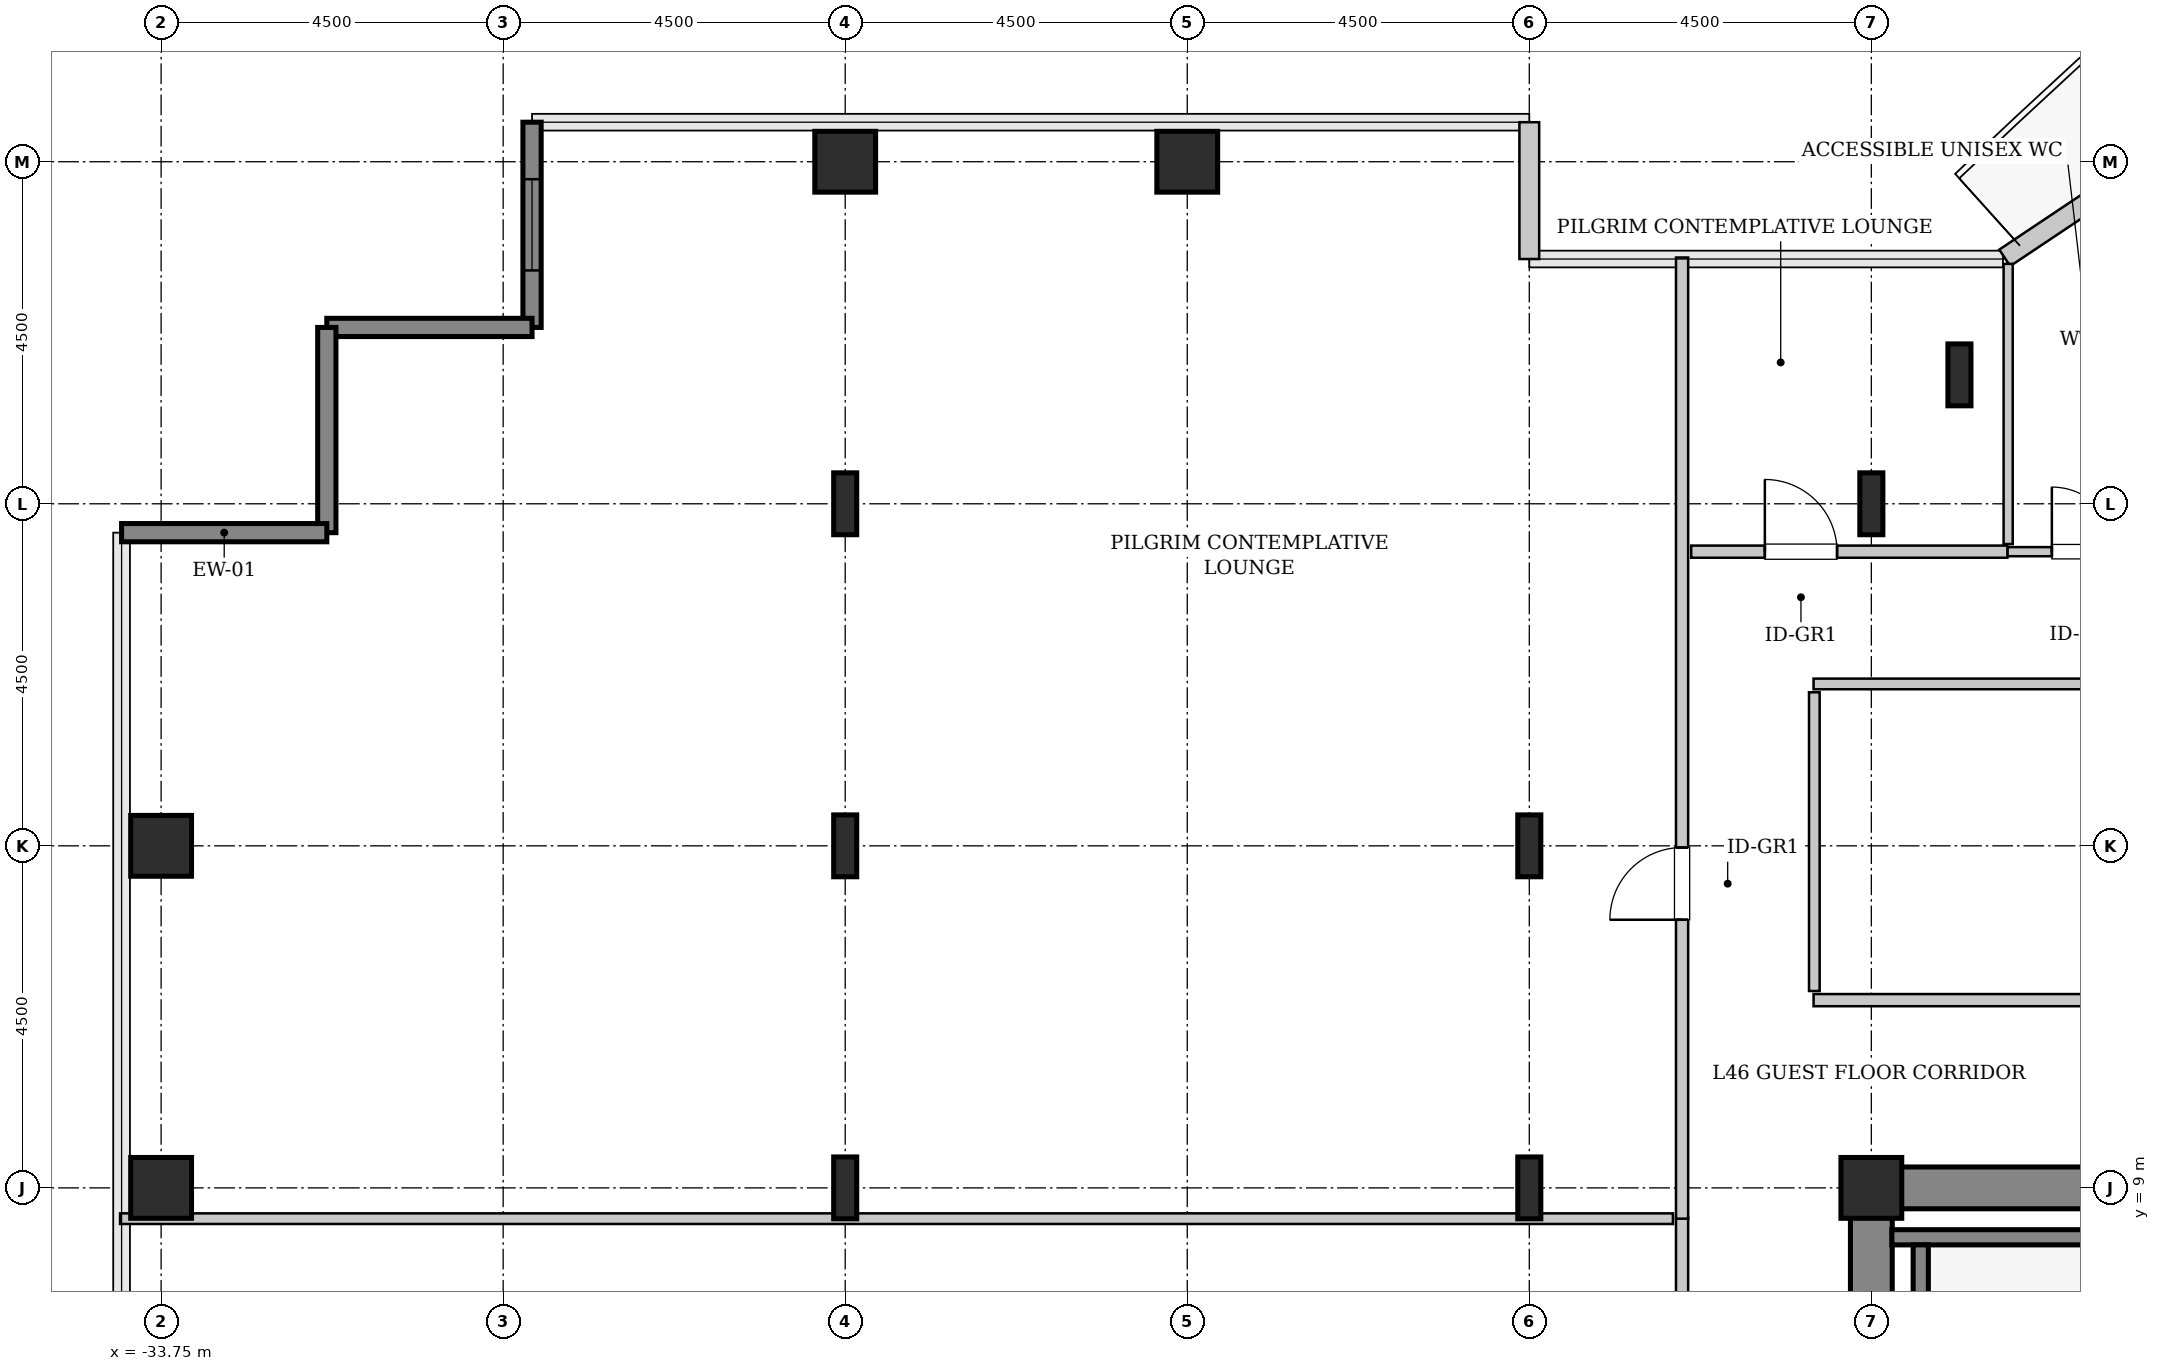
"""IFC4 building model, lengths in metres.
Left out: names, types, materials, properties, quantities, classifications, styles, units other than length and angle.
Written with IfcOpenShell. Run it as: python <this file> out.ifc"""

import sys

from ifc_helpers import new_model, si_unit, direction, frame, frame_2d, origin, origin_2d, place, context, subcontext, project, spatial, rectangle, hollow_rectangle, i_section, extrude, source, transform, mapped, element, fill, save


model = new_model("IFC4")
c1 = context("Model", 3, precision=1e-05, world=origin(), true_north=direction((0.0, 1.0)))
c2 = subcontext(c1, "Body", "Model", "MODEL_VIEW")
j1 = project(units=[si_unit("LENGTHUNIT", "METRE"), si_unit("PLANEANGLEUNIT", "RADIAN")], contexts=[c1])
p1 = place(None, origin())
s1 = spatial("IfcSite", under=j1, at=p1, CompositionType="ELEMENT")
p2 = place(p1, origin())
s2 = spatial("IfcBuilding", under=s1, at=p2, CompositionType="ELEMENT")
p3 = place(p2, frame((0.0, 0.0, 186.8)))
s3 = spatial("IfcBuildingStorey", under=s2, at=p3, CompositionType="ELEMENT", Elevation=186.8)
m1 = source(origin(), c2, "Body", "SweptSolid", [
    extrude(rectangle(XDim=9.975, YDim=0.55, at=frame_2d((4.987, 0.0))), origin(), (0.0, 0.0, 1.0), 3.8),
])
p4 = place(p3, frame((-11.525, 9.0, 0.0), z_axis=(0.0, 0.0, 1.0), x_axis=(1.0, 0.0, 0.0)))
e1 = element("IfcWall", 1, at=p4, inside=s3, PredefinedType="SHEAR", context=c2, shape_type="MappedRepresentation", body=[
    mapped(m1, transform((0.0, 0.0, 0.0), x_axis=(1.0, 0.0, 0.0), y_axis=(0.0, 1.0, 0.0), z_axis=(0.0, 0.0, 1.0), scale=1.0)),
])
m2 = source(origin(), c2, "Body", "SweptSolid", [
    extrude(rectangle(XDim=7.375, YDim=0.55, at=frame_2d((3.688, 0.0))), origin(), (0.0, 0.0, 1.0), 3.8),
])
p5 = place(p3, frame((-11.25, 1.35, 0.0), z_axis=(0.0, 0.0, 1.0), x_axis=(0.0, 1.0, 0.0)))
e2 = element("IfcWall", 2, at=p5, inside=s3, PredefinedType="SHEAR", context=c2, shape_type="MappedRepresentation", body=[
    mapped(m2, transform((0.0, 0.0, 0.0), x_axis=(1.0, 0.0, 0.0), y_axis=(0.0, 1.0, 0.0), z_axis=(0.0, 0.0, 1.0), scale=1.0)),
])
m3 = source(origin(), c2, "Body", "SweptSolid", [
    extrude(hollow_rectangle(XDim=0.8, YDim=0.8, WallThickness=0.04, InnerFilletRadius=0.04, OuterFilletRadius=0.08, at=origin_2d()), origin(), (0.0, 0.0, 1.0), 3.8),
])
for number, where, z_axis, x_axis in (
    (3, (-33.75, 9.0, 0.0), (0.0, 0.0, 1.0), (1.0, 0.0, 0.0)),
    (4, (-33.75, 13.5, 0.0), (0.0, 0.0, 1.0), (1.0, 0.0, 0.0)),
):
    element("IfcColumn", number, at=place(p3, frame(where, z_axis=z_axis, x_axis=x_axis)), inside=s3, PredefinedType="COLUMN", context=c2, shape_type="MappedRepresentation", body=[
        mapped(m3, transform((0.0, 0.0, 0.0), x_axis=(1.0, 0.0, 0.0), y_axis=(0.0, 1.0, 0.0), z_axis=(0.0, 0.0, 1.0), scale=1.0)),
    ])
m4 = source(origin(), c2, "Body", "SweptSolid", [
    extrude(i_section(OverallWidth=0.303, OverallDepth=0.814, WebThickness=0.021, FlangeThickness=0.04, FilletRadius=0.03, at=origin_2d()), origin(), (0.0, 0.0, 1.0), 3.8),
])
for number, where, z_axis, x_axis in (
    (5, (-24.75, 9.0, 0.0), (0.0, 0.0, 1.0), (1.0, 0.0, 0.0)),
    (6, (-24.75, 13.5, 0.0), (0.0, 0.0, 1.0), (1.0, 0.0, 0.0)),
    (7, (-24.75, 18.0, 0.0), (0.0, 0.0, 1.0), (1.0, 0.0, 0.0)),
):
    element("IfcColumn", number, at=place(p3, frame(where, z_axis=z_axis, x_axis=x_axis)), inside=s3, PredefinedType="COLUMN", context=c2, shape_type="MappedRepresentation", body=[
        mapped(m4, transform((0.0, 0.0, 0.0), x_axis=(1.0, 0.0, 0.0), y_axis=(0.0, 1.0, 0.0), z_axis=(0.0, 0.0, 1.0), scale=1.0)),
    ])
for number, where, z_axis, x_axis in (
    (8, (-24.75, 22.5, 0.0), (0.0, 0.0, 1.0), (1.0, 0.0, 0.0)),
    (9, (-20.25, 22.5, 0.0), (0.0, 0.0, 1.0), (1.0, 0.0, 0.0)),
):
    element("IfcColumn", number, at=place(p3, frame(where, z_axis=z_axis, x_axis=x_axis)), inside=s3, PredefinedType="COLUMN", context=c2, shape_type="MappedRepresentation", body=[
        mapped(m3, transform((0.0, 0.0, 0.0), x_axis=(1.0, 0.0, 0.0), y_axis=(0.0, 1.0, 0.0), z_axis=(0.0, 0.0, 1.0), scale=1.0)),
    ])
for number, where, z_axis, x_axis in (
    (10, (-15.75, 9.0, 0.0), (0.0, 0.0, 1.0), (1.0, 0.0, 0.0)),
    (11, (-15.75, 13.5, 0.0), (0.0, 0.0, 1.0), (1.0, 0.0, 0.0)),
):
    element("IfcColumn", number, at=place(p3, frame(where, z_axis=z_axis, x_axis=x_axis)), inside=s3, PredefinedType="COLUMN", context=c2, shape_type="MappedRepresentation", body=[
        mapped(m4, transform((0.0, 0.0, 0.0), x_axis=(1.0, 0.0, 0.0), y_axis=(0.0, 1.0, 0.0), z_axis=(0.0, 0.0, 1.0), scale=1.0)),
    ])
m5 = source(origin(), c2, "Body", "SweptSolid", [
    extrude(hollow_rectangle(XDim=0.8, YDim=0.8, WallThickness=0.04, InnerFilletRadius=0.04, OuterFilletRadius=0.08, at=origin_2d()), origin(), (0.0, 0.0, 1.0), 3.8),
])
p6 = place(p3, frame((-11.25, 9.0, 0.0), z_axis=(0.0, 0.0, 1.0), x_axis=(1.0, 0.0, 0.0)))
e12 = element("IfcColumn", 12, at=p6, inside=s3, PredefinedType="COLUMN", context=c2, shape_type="MappedRepresentation", body=[
    mapped(m5, transform((0.0, 0.0, 0.0), x_axis=(1.0, 0.0, 0.0), y_axis=(0.0, 1.0, 0.0), z_axis=(0.0, 0.0, 1.0), scale=1.0)),
])
for number, where, z_axis, x_axis in (
    (13, (-11.25, 18.0, 0.0), (0.0, 0.0, 1.0), (1.0, 0.0, 0.0)),
    (14, (-10.091, 19.696, 0.0), (0.0, 0.0, 1.0), (1.0, 0.0, 0.0)),
):
    element("IfcColumn", number, at=place(p3, frame(where, z_axis=z_axis, x_axis=x_axis)), inside=s3, PredefinedType="COLUMN", context=c2, shape_type="MappedRepresentation", body=[
        mapped(m4, transform((0.0, 0.0, 0.0), x_axis=(1.0, 0.0, 0.0), y_axis=(0.0, 1.0, 0.0), z_axis=(0.0, 0.0, 1.0), scale=1.0)),
    ])
m6 = source(origin(), c2, "Body", "SweptSolid", [
    extrude(rectangle(XDim=1.469, YDim=0.26, at=frame_2d((0.734, 0.0))), origin(), (0.0, 0.0, 1.0), 3.55),
])
p7 = place(p3, frame((-8.273, 22.052, 0.0), z_axis=(0.0, 0.0, 1.0), x_axis=(-0.831461760506, -0.555581983884, 0.0)))
e15 = element("IfcWall", 15, at=p7, inside=s3, PredefinedType="SOLIDWALL", context=c2, shape_type="MappedRepresentation", body=[
    mapped(m6, transform((0.0, 0.0, 0.0), x_axis=(1.0, 0.0, 0.0), y_axis=(0.0, 1.0, 0.0), z_axis=(0.0, 0.0, 1.0), scale=1.0)),
])
m7 = source(origin(), c2, "Body", "SweptSolid", [
    extrude(rectangle(XDim=1.8, YDim=0.26, at=frame_2d((0.9, 0.0))), origin(), (0.0, 0.0, 1.0), 3.55),
])
p8 = place(p3, frame((-15.75, 21.22, 0.0), z_axis=(0.0, 0.0, 1.0), x_axis=(0.0, 1.0, 0.0)))
e16 = element("IfcWall", 16, at=p8, inside=s3, PredefinedType="SOLIDWALL", context=c2, shape_type="MappedRepresentation", body=[
    mapped(m7, transform((0.0, 0.0, 0.0), x_axis=(1.0, 0.0, 0.0), y_axis=(0.0, 1.0, 0.0), z_axis=(0.0, 0.0, 1.0), scale=1.0)),
])
m8 = source(origin(), c2, "Body", "SweptSolid", [
    extrude(rectangle(XDim=2.7, YDim=0.24, at=frame_2d((1.35, 0.0))), origin(), (0.0, 0.0, 1.0), 3.55),
])
p9 = place(p3, frame((-28.87, 23.02, 0.0), z_axis=(0.0, 0.0, 1.0), x_axis=(0.0, -1.0, 0.0)))
e17 = element("IfcWall", 17, at=p9, inside=s3, PredefinedType="SHEAR", context=c2, shape_type="MappedRepresentation", body=[
    mapped(m8, transform((0.0, 0.0, 0.0), x_axis=(1.0, 0.0, 0.0), y_axis=(0.0, 1.0, 0.0), z_axis=(0.0, 0.0, 1.0), scale=1.0)),
])
p10 = place(p9, frame((0.75, 0.0, 0.85)))
e18 = element("IfcOpeningElement", 18, at=p10, cuts=e17, PredefinedType="OPENING", context=c2, shape_type="SweptSolid", body=[
    extrude(rectangle(XDim=1.2, YDim=1.8, at=frame_2d((0.6, 0.9))), frame((0.0, 0.13, 0.0), z_axis=(0.0, -1.0, 0.0), x_axis=(1.0, 0.0, 0.0)), (0.0, 0.0, 1.0), 0.26),
])
for number, where, z_axis, x_axis in (
    (19, (-28.87, 20.32, 0.0), (0.0, 0.0, 1.0), (-1.0, 0.0, 0.0)),
    (20, (-31.57, 20.32, 0.0), (0.0, 0.0, 1.0), (0.0, -1.0, 0.0)),
    (21, (-31.57, 17.62, 0.0), (0.0, 0.0, 1.0), (-1.0, 0.0, 0.0)),
):
    element("IfcWall", number, at=place(p3, frame(where, z_axis=z_axis, x_axis=x_axis)), inside=s3, PredefinedType="SHEAR", context=c2, shape_type="MappedRepresentation", body=[
        mapped(m8, transform((0.0, 0.0, 0.0), x_axis=(1.0, 0.0, 0.0), y_axis=(0.0, 1.0, 0.0), z_axis=(0.0, 0.0, 1.0), scale=1.0)),
    ])
m9 = source(origin(), c2, "Body", "SweptSolid", [
    extrude(rectangle(XDim=3.68, YDim=0.2, at=frame_2d((1.84, 0.0))), origin(), (0.0, 0.0, 1.0), 3.8),
])
p11 = place(p3, frame((-7.3, 8.35, 0.0), z_axis=(0.0, 0.0, 1.0), x_axis=(-1.0, 0.0, 0.0)))
e22 = element("IfcWall", 22, at=p11, inside=s3, PredefinedType="SOLIDWALL", context=c2, shape_type="MappedRepresentation", body=[
    mapped(m9, transform((0.0, 0.0, 0.0), x_axis=(1.0, 0.0, 0.0), y_axis=(0.0, 1.0, 0.0), z_axis=(0.0, 0.0, 1.0), scale=1.0)),
])
m10 = source(origin(), c2, "Body", "SweptSolid", [
    extrude(rectangle(XDim=7.1, YDim=0.2, at=frame_2d((3.55, 0.0))), origin(), (0.0, 0.0, 1.0), 3.8),
])
p12 = place(p3, frame((-10.6, 1.15, 0.0), z_axis=(0.0, 0.0, 1.0), x_axis=(0.0, 1.0, 0.0)))
e23 = element("IfcWall", 23, at=p12, inside=s3, PredefinedType="SOLIDWALL", context=c2, shape_type="MappedRepresentation", body=[
    mapped(m10, transform((0.0, 0.0, 0.0), x_axis=(1.0, 0.0, 0.0), y_axis=(0.0, 1.0, 0.0), z_axis=(0.0, 0.0, 1.0), scale=1.0)),
])
m11 = source(origin(), c2, "Body", "SweptSolid", [
    extrude(rectangle(XDim=2.02, YDim=0.12, at=frame_2d((1.01, 0.0))), origin(), (0.0, 0.0, 1.0), 3.535),
])
p13 = place(p3, frame((-9.46, 17.37, 0.0), z_axis=(0.0, 0.0, 1.0), x_axis=(1.0, 0.0, 0.0)))
e24 = element("IfcWall", 24, at=p13, inside=s3, PredefinedType="PLUMBINGWALL", context=c2, shape_type="MappedRepresentation", body=[
    mapped(m11, transform((0.0, 0.0, 0.0), x_axis=(1.0, 0.0, 0.0), y_axis=(0.0, 1.0, 0.0), z_axis=(0.0, 0.0, 1.0), scale=1.0)),
])
p14 = place(p13, frame((0.585, 0.0, 0.0)))
e25 = element("IfcOpeningElement", 25, at=p14, cuts=e24, PredefinedType="OPENING", context=c2, shape_type="SweptSolid", body=[
    extrude(rectangle(XDim=0.85, YDim=2.1, at=frame_2d((0.425, 1.05))), frame((0.0, 0.07, 0.0), z_axis=(0.0, -1.0, 0.0), x_axis=(1.0, 0.0, 0.0)), (0.0, 0.0, 1.0), 0.14),
])
m12 = source(origin(), c2, "Body", "SweptSolid", [
    extrude(rectangle(XDim=3.687, YDim=0.12, at=frame_2d((1.843, 0.0))), origin(), (0.0, 0.0, 1.0), 3.535),
])
p15 = place(p3, frame((-9.45, 17.47, 0.0), z_axis=(0.0, 0.0, 1.0), x_axis=(0.0, 1.0, 0.0)))
e26 = element("IfcWall", 26, at=p15, inside=s3, PredefinedType="PLUMBINGWALL", context=c2, shape_type="MappedRepresentation", body=[
    mapped(m12, transform((0.0, 0.0, 0.0), x_axis=(1.0, 0.0, 0.0), y_axis=(0.0, 1.0, 0.0), z_axis=(0.0, 0.0, 1.0), scale=1.0)),
])
m13 = source(origin(), c2, "Body", "SweptSolid", [
    extrude(rectangle(XDim=3.21, YDim=0.16, at=frame_2d((1.605, 0.0))), origin(), (0.0, 0.0, 1.0), 3.535),
])
p16 = place(p3, frame((-13.74, 5.395, 0.0), z_axis=(0.0, 0.0, 1.0), x_axis=(0.0, 1.0, 0.0)))
e27 = element("IfcWall", 27, at=p16, inside=s3, PredefinedType="PARTITIONING", context=c2, shape_type="MappedRepresentation", body=[
    mapped(m13, transform((0.0, 0.0, 0.0), x_axis=(1.0, 0.0, 0.0), y_axis=(0.0, 1.0, 0.0), z_axis=(0.0, 0.0, 1.0), scale=1.0)),
])
p17 = place(p16, frame((1.13, 0.0, 0.0)))
e28 = element("IfcOpeningElement", 28, at=p17, cuts=e27, PredefinedType="OPENING", context=c2, shape_type="SweptSolid", body=[
    extrude(rectangle(XDim=0.95, YDim=2.1, at=frame_2d((0.475, 1.05))), frame((0.0, 0.09, 0.0), z_axis=(0.0, -1.0, 0.0), x_axis=(1.0, 0.0, 0.0)), (0.0, 0.0, 1.0), 0.18),
])
m14 = source(origin(), c2, "Body", "SweptSolid", [
    extrude(rectangle(XDim=20.43, YDim=0.14, at=frame_2d((10.215, 0.0))), origin(), (0.0, 0.0, 1.0), 2.875),
])
p18 = place(p3, frame((-34.29, 8.595, 0.0), z_axis=(0.0, 0.0, 1.0), x_axis=(1.0, 0.0, 0.0)))
e29 = element("IfcWall", 29, at=p18, inside=s3, PredefinedType="PARTITIONING", context=c2, shape_type="MappedRepresentation", body=[
    mapped(m14, transform((0.0, 0.0, 0.0), x_axis=(1.0, 0.0, 0.0), y_axis=(0.0, 1.0, 0.0), z_axis=(0.0, 0.0, 1.0), scale=1.0)),
])
m15 = source(origin(), c2, "Body", "SweptSolid", [
    extrude(rectangle(XDim=12.645, YDim=0.16, at=frame_2d((6.323, 0.0))), origin(), (0.0, 0.0, 1.0), 3.535),
])
p19 = place(p3, frame((-13.74, 8.595, 0.0), z_axis=(0.0, 0.0, 1.0), x_axis=(0.0, 1.0, 0.0)))
e30 = element("IfcWall", 30, at=p19, inside=s3, PredefinedType="PARTITIONING", context=c2, shape_type="MappedRepresentation", body=[
    mapped(m15, transform((0.0, 0.0, 0.0), x_axis=(1.0, 0.0, 0.0), y_axis=(0.0, 1.0, 0.0), z_axis=(0.0, 0.0, 1.0), scale=1.0)),
])
p20 = place(p19, frame((3.933, 0.0, 0.0)))
e31 = element("IfcOpeningElement", 31, at=p20, cuts=e30, PredefinedType="OPENING", context=c2, shape_type="SweptSolid", body=[
    extrude(rectangle(XDim=0.95, YDim=2.1, at=frame_2d((0.475, 1.05))), frame((0.0, 0.09, 0.0), z_axis=(0.0, -1.0, 0.0), x_axis=(1.0, 0.0, 0.0)), (0.0, 0.0, 1.0), 0.18),
])
m16 = source(origin(), c2, "Body", "SweptSolid", [
    extrude(rectangle(XDim=13.815, YDim=0.16, at=frame_2d((6.907, 0.0))), origin(), (0.0, 0.0, 1.0), 3.535),
])
p21 = place(p3, frame((-12.01, 11.47, 0.0), z_axis=(0.0, 0.0, 1.0), x_axis=(1.0, 0.0, 0.0)))
e32 = element("IfcWall", 32, at=p21, inside=s3, PredefinedType="PARTITIONING", context=c2, shape_type="MappedRepresentation", body=[
    mapped(m16, transform((0.0, 0.0, 0.0), x_axis=(1.0, 0.0, 0.0), y_axis=(0.0, 1.0, 0.0), z_axis=(0.0, 0.0, 1.0), scale=1.0)),
])
p22 = place(p21, frame((6.433, 0.0, 0.0)))
e33 = element("IfcOpeningElement", 33, at=p22, cuts=e32, PredefinedType="OPENING", context=c2, shape_type="SweptSolid", body=[
    extrude(rectangle(XDim=0.95, YDim=2.1, at=frame_2d((0.475, 1.05))), frame((0.0, 0.09, 0.0), z_axis=(0.0, -1.0, 0.0), x_axis=(1.0, 0.0, 0.0)), (0.0, 0.0, 1.0), 0.18),
])
m17 = source(origin(), c2, "Body", "SweptSolid", [
    extrude(rectangle(XDim=13.815, YDim=0.14, at=frame_2d((6.907, 0.0))), origin(), (0.0, 0.0, 1.0), 3.535),
])
p23 = place(p3, frame((-12.01, 15.63, 0.0), z_axis=(0.0, 0.0, 1.0), x_axis=(1.0, 0.0, 0.0)))
e34 = element("IfcWall", 34, at=p23, inside=s3, PredefinedType="PARTITIONING", context=c2, shape_type="MappedRepresentation", body=[
    mapped(m17, transform((0.0, 0.0, 0.0), x_axis=(1.0, 0.0, 0.0), y_axis=(0.0, 1.0, 0.0), z_axis=(0.0, 0.0, 1.0), scale=1.0)),
])
m18 = source(origin(), c2, "Body", "SweptSolid", [
    extrude(rectangle(XDim=3.93, YDim=0.14, at=frame_2d((1.965, 0.0))), origin(), (0.0, 0.0, 1.0), 3.535),
])
p24 = place(p3, frame((-12.0, 11.59, 0.0), z_axis=(0.0, 0.0, 1.0), x_axis=(0.0, 1.0, 0.0)))
e35 = element("IfcWall", 35, at=p24, inside=s3, PredefinedType="PARTITIONING", context=c2, shape_type="MappedRepresentation", body=[
    mapped(m18, transform((0.0, 0.0, 0.0), x_axis=(1.0, 0.0, 0.0), y_axis=(0.0, 1.0, 0.0), z_axis=(0.0, 0.0, 1.0), scale=1.0)),
])
m19 = source(origin(), c2, "Body", "SweptSolid", [
    extrude(rectangle(XDim=4.16, YDim=0.16, at=frame_2d((2.08, 0.0))), origin(), (0.0, 0.0, 1.0), 3.535),
])
p25 = place(p3, frame((-13.62, 17.37, 0.0), z_axis=(0.0, 0.0, 1.0), x_axis=(1.0, 0.0, 0.0)))
e36 = element("IfcWall", 36, at=p25, inside=s3, PredefinedType="PARTITIONING", context=c2, shape_type="MappedRepresentation", body=[
    mapped(m19, transform((0.0, 0.0, 0.0), x_axis=(1.0, 0.0, 0.0), y_axis=(0.0, 1.0, 0.0), z_axis=(0.0, 0.0, 1.0), scale=1.0)),
])
p26 = place(p25, frame((0.969, 0.0, 0.0)))
e37 = element("IfcOpeningElement", 37, at=p26, cuts=e36, PredefinedType="OPENING", context=c2, shape_type="SweptSolid", body=[
    extrude(rectangle(XDim=0.95, YDim=2.1, at=frame_2d((0.475, 1.05))), frame((0.0, 0.09, 0.0), z_axis=(0.0, -1.0, 0.0), x_axis=(1.0, 0.0, 0.0)), (0.0, 0.0, 1.0), 0.18),
])
m20 = source(origin(), c2, "Body", "SweptSolid", [
    extrude(rectangle(XDim=1.2, YDim=1.8, at=frame_2d((0.6, 0.9))), frame((0.0, 0.03, 0.0), z_axis=(0.0, -1.0, 0.0), x_axis=(1.0, 0.0, 0.0)), (0.0, 0.0, 1.0), 0.06),
])
p27 = place(p10, origin())
e38 = element("IfcWindow", 38, at=p27, inside=s3, PartitioningType="SINGLE_PANEL", PredefinedType="WINDOW", context=c2, shape_type="MappedRepresentation", body=[
    mapped(m20, transform((0.0, 0.0, 0.0), x_axis=(1.0, 0.0, 0.0), y_axis=(0.0, 1.0, 0.0), z_axis=(0.0, 0.0, 1.0), scale=1.0)),
])
fill(e18, e38)
m21 = source(origin(), c2, "Body", "SweptSolid", [
    extrude(rectangle(XDim=0.85, YDim=2.1, at=frame_2d((0.425, 1.05))), frame((0.0, 0.025, 0.0), z_axis=(0.0, -1.0, 0.0), x_axis=(1.0, 0.0, 0.0)), (0.0, 0.0, 1.0), 0.05),
])
p28 = place(p14, origin())
e39 = element("IfcDoor", 39, at=p28, inside=s3, OperationType="SINGLE_SWING_LEFT", PredefinedType="DOOR", context=c2, shape_type="MappedRepresentation", body=[
    mapped(m21, transform((0.0, 0.0, 0.0), x_axis=(1.0, 0.0, 0.0), y_axis=(0.0, 1.0, 0.0), z_axis=(0.0, 0.0, 1.0), scale=1.0)),
])
fill(e25, e39)
m22 = source(origin(), c2, "Body", "SweptSolid", [
    extrude(rectangle(XDim=0.95, YDim=2.1, at=frame_2d((0.475, 1.05))), frame((0.0, 0.025, 0.0), z_axis=(0.0, -1.0, 0.0), x_axis=(1.0, 0.0, 0.0)), (0.0, 0.0, 1.0), 0.05),
])
p29 = place(p20, origin())
e40 = element("IfcDoor", 40, at=p29, inside=s3, OperationType="SINGLE_SWING_LEFT", PredefinedType="DOOR", context=c2, shape_type="MappedRepresentation", body=[
    mapped(m22, transform((0.0, 0.0, 0.0), x_axis=(1.0, 0.0, 0.0), y_axis=(0.0, 1.0, 0.0), z_axis=(0.0, 0.0, 1.0), scale=1.0)),
])
fill(e31, e40)
p30 = place(p26, origin())
e41 = element("IfcDoor", 41, at=p30, inside=s3, OperationType="SINGLE_SWING_LEFT", PredefinedType="DOOR", context=c2, shape_type="MappedRepresentation", body=[
    mapped(m22, transform((0.0, 0.0, 0.0), x_axis=(1.0, 0.0, 0.0), y_axis=(0.0, 1.0, 0.0), z_axis=(0.0, 0.0, 1.0), scale=1.0)),
])
fill(e37, e41)
save(model, sys.argv[1])
